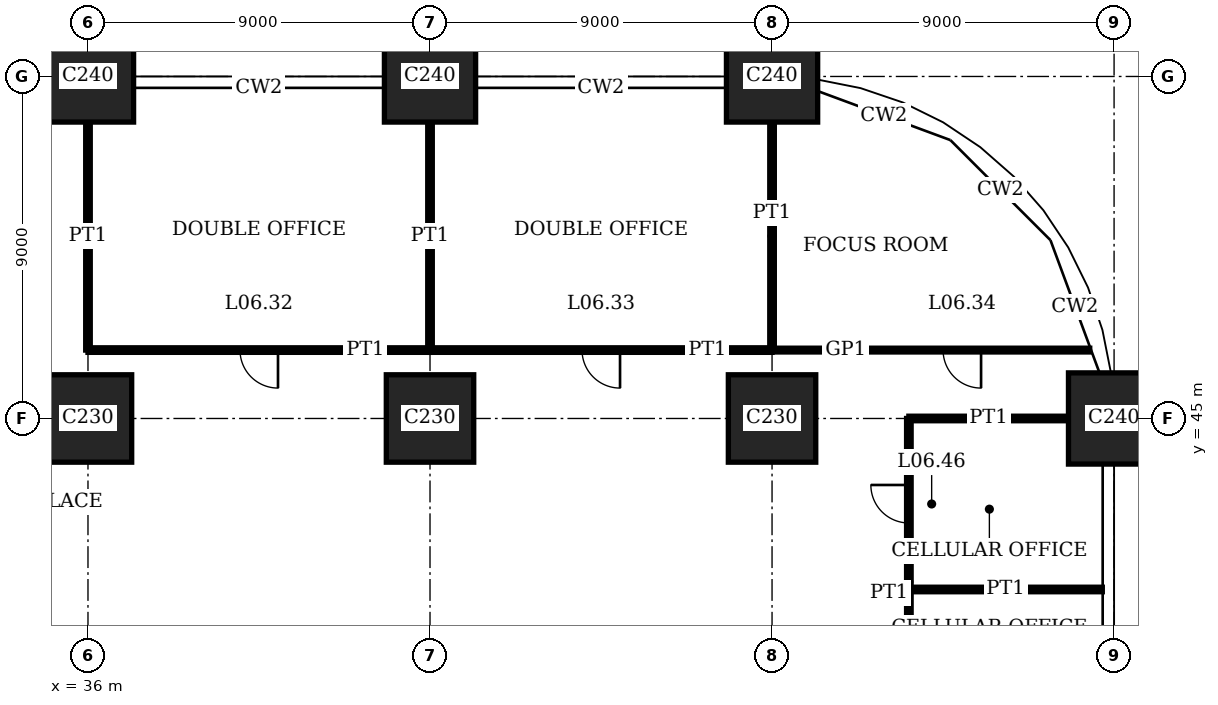
"""IFC4 building model, lengths in metres.
Left out: names, types, materials, properties, quantities, classifications, styles, units other than length and angle.
Written with IfcOpenShell. Run it as: python <this file> out.ifc"""

import sys

from ifc_helpers import new_model, si_unit, direction, frame, frame_2d, origin, origin_2d, place, context, subcontext, project, spatial, rectangle, extrude, element, fill, save


model = new_model("IFC4")
c1 = context("Model", 3, precision=1e-05, world=origin(), true_north=direction((0.0, 1.0)))
c2 = subcontext(c1, "Body", "Model", "MODEL_VIEW")
j1 = project(units=[si_unit("LENGTHUNIT", "METRE"), si_unit("PLANEANGLEUNIT", "RADIAN")], contexts=[c1])
p1 = place(None, origin())
s1 = spatial("IfcSite", under=j1, at=p1, CompositionType="ELEMENT")
p2 = place(p1, origin())
s2 = spatial("IfcBuilding", under=s1, at=p2, CompositionType="ELEMENT")
p3 = place(p2, frame((0.0, 0.0, 27.8)))
s3 = spatial("IfcBuildingStorey", under=s2, at=p3, CompositionType="ELEMENT", Elevation=27.8)
p4 = place(p3, frame((36.0, 45.0, 0.0), z_axis=(0.0, 0.0, 1.0), x_axis=(1.0, 0.0, 0.0)))
e1 = element("IfcColumn", 1, at=p4, inside=s3, PredefinedType="COLUMN", context=c2, shape_type="SweptSolid", body=[
    extrude(rectangle(XDim=2.3, YDim=2.3, at=origin_2d()), origin(), (0.0, 0.0, 1.0), 4.0),
])
p5 = place(p3, frame((36.0, 54.0, 0.0), z_axis=(0.0, 0.0, 1.0), x_axis=(1.0, 0.0, 0.0)))
e2 = element("IfcColumn", 2, at=p5, inside=s3, PredefinedType="COLUMN", context=c2, shape_type="SweptSolid", body=[
    extrude(rectangle(XDim=2.4, YDim=2.4, at=origin_2d()), origin(), (0.0, 0.0, 1.0), 4.0),
])
p6 = place(p3, frame((45.0, 45.0, 0.0), z_axis=(0.0, 0.0, 1.0), x_axis=(1.0, 0.0, 0.0)))
e3 = element("IfcColumn", 3, at=p6, inside=s3, PredefinedType="COLUMN", context=c2, shape_type="SweptSolid", body=[
    extrude(rectangle(XDim=2.3, YDim=2.3, at=origin_2d()), origin(), (0.0, 0.0, 1.0), 4.0),
])
p7 = place(p3, frame((45.0, 54.0, 0.0), z_axis=(0.0, 0.0, 1.0), x_axis=(1.0, 0.0, 0.0)))
e4 = element("IfcColumn", 4, at=p7, inside=s3, PredefinedType="COLUMN", context=c2, shape_type="SweptSolid", body=[
    extrude(rectangle(XDim=2.4, YDim=2.4, at=origin_2d()), origin(), (0.0, 0.0, 1.0), 4.0),
])
p8 = place(p3, frame((54.0, 45.0, 0.0), z_axis=(0.0, 0.0, 1.0), x_axis=(1.0, 0.0, 0.0)))
e5 = element("IfcColumn", 5, at=p8, inside=s3, PredefinedType="COLUMN", context=c2, shape_type="SweptSolid", body=[
    extrude(rectangle(XDim=2.3, YDim=2.3, at=origin_2d()), origin(), (0.0, 0.0, 1.0), 4.0),
])
for number, where, z_axis, x_axis in (
    (6, (54.0, 54.0, 0.0), (0.0, 0.0, 1.0), (1.0, 0.0, 0.0)),
    (7, (63.0, 45.0, 0.0), (0.0, 0.0, 1.0), (1.0, 0.0, 0.0)),
):
    element("IfcColumn", number, at=place(p3, frame(where, z_axis=z_axis, x_axis=x_axis)), inside=s3, PredefinedType="COLUMN", context=c2, shape_type="SweptSolid", body=[
        extrude(rectangle(XDim=2.4, YDim=2.4, at=origin_2d()), origin(), (0.0, 0.0, 1.0), 4.0),
    ])
p9 = place(p3, frame((57.6, 40.5, 0.0), z_axis=(0.0, 0.0, 1.0), x_axis=(1.0, 0.0, 0.0)))
e8 = element("IfcWall", 8, at=p9, inside=s3, PredefinedType="PARTITIONING", context=c2, shape_type="SweptSolid", body=[
    extrude(rectangle(XDim=5.09, YDim=0.12, at=frame_2d((2.545, 0.0))), origin(), (0.0, 0.0, 1.0), 3.1),
])
p10 = place(p3, frame((57.6, 45.0, 0.0), z_axis=(0.0, 0.0, 1.0), x_axis=(1.0, 0.0, 0.0)))
e9 = element("IfcWall", 9, at=p10, inside=s3, PredefinedType="PARTITIONING", context=c2, shape_type="SweptSolid", body=[
    extrude(rectangle(XDim=4.2, YDim=0.12, at=frame_2d((2.1, 0.0))), origin(), (0.0, 0.0, 1.0), 3.05),
])
p11 = place(p3, frame((36.0, 46.8, 0.0), z_axis=(0.0, 0.0, 1.0), x_axis=(1.0, 0.0, 0.0)))
e10 = element("IfcWall", 10, at=p11, inside=s3, PredefinedType="PARTITIONING", context=c2, shape_type="SweptSolid", body=[
    extrude(rectangle(XDim=9.0, YDim=0.12, at=frame_2d((4.5, 0.0))), origin(), (0.0, 0.0, 1.0), 3.75),
])
p12 = place(p11, frame((4.0, 0.0, 0.0)))
e11 = element("IfcOpeningElement", 11, at=p12, cuts=e10, PredefinedType="OPENING", context=c2, shape_type="SweptSolid", body=[
    extrude(rectangle(XDim=1.0, YDim=2.4, at=frame_2d((0.5, 1.2))), frame((0.0, 0.07, 0.0), z_axis=(0.0, -1.0, 0.0), x_axis=(1.0, 0.0, 0.0)), (0.0, 0.0, 1.0), 0.14),
])
p13 = place(p3, frame((45.0, 46.8, 0.0), z_axis=(0.0, 0.0, 1.0), x_axis=(1.0, 0.0, 0.0)))
e12 = element("IfcWall", 12, at=p13, inside=s3, PredefinedType="PARTITIONING", context=c2, shape_type="SweptSolid", body=[
    extrude(rectangle(XDim=9.0, YDim=0.12, at=frame_2d((4.5, 0.0))), origin(), (0.0, 0.0, 1.0), 3.75),
])
p14 = place(p13, frame((4.0, 0.0, 0.0)))
e13 = element("IfcOpeningElement", 13, at=p14, cuts=e12, PredefinedType="OPENING", context=c2, shape_type="SweptSolid", body=[
    extrude(rectangle(XDim=1.0, YDim=2.4, at=frame_2d((0.5, 1.2))), frame((0.0, 0.07, 0.0), z_axis=(0.0, -1.0, 0.0), x_axis=(1.0, 0.0, 0.0)), (0.0, 0.0, 1.0), 0.14),
])
p15 = place(p3, frame((54.0, 46.8, 0.0), z_axis=(0.0, 0.0, 1.0), x_axis=(1.0, 0.0, 0.0)))
e14 = element("IfcWall", 14, at=p15, inside=s3, PredefinedType="PARTITIONING", context=c2, shape_type="SweptSolid", body=[
    extrude(rectangle(XDim=8.359, YDim=0.1, at=frame_2d((4.18, 0.0))), origin(), (0.0, 0.0, 1.0), 3.75),
])
p16 = place(p15, frame((4.5, 0.0, 0.0)))
e15 = element("IfcOpeningElement", 15, at=p16, cuts=e14, PredefinedType="OPENING", context=c2, shape_type="SweptSolid", body=[
    extrude(rectangle(XDim=1.0, YDim=2.4, at=frame_2d((0.5, 1.2))), frame((0.0, 0.06, 0.0), z_axis=(0.0, -1.0, 0.0), x_axis=(1.0, 0.0, 0.0)), (0.0, 0.0, 1.0), 0.12),
])
for number, where, z_axis, x_axis in (
    (16, (36.0, 46.8, 0.0), (0.0, 0.0, 1.0), (0.0, 1.0, 0.0)),
    (17, (45.0, 46.8, 0.0), (0.0, 0.0, 1.0), (0.0, 1.0, 0.0)),
    (18, (54.0, 46.8, 0.0), (0.0, 0.0, 1.0), (0.0, 1.0, 0.0)),
):
    element("IfcWall", number, at=place(p3, frame(where, z_axis=z_axis, x_axis=x_axis)), inside=s3, PredefinedType="PARTITIONING", context=c2, shape_type="SweptSolid", body=[
        extrude(rectangle(XDim=6.0, YDim=0.12, at=frame_2d((3.0, 0.0))), origin(), (0.0, 0.0, 1.0), 3.05),
    ])
p17 = place(p3, frame((57.6, 36.0, 0.0), z_axis=(0.0, 0.0, 1.0), x_axis=(0.0, 1.0, 0.0)))
e19 = element("IfcWall", 19, at=p17, inside=s3, PredefinedType="PARTITIONING", context=c2, shape_type="SweptSolid", body=[
    extrude(rectangle(XDim=4.5, YDim=0.12, at=frame_2d((2.25, 0.0))), origin(), (0.0, 0.0, 1.0), 3.75),
])
p18 = place(p17, frame((1.75, 0.0, 0.0)))
e20 = element("IfcOpeningElement", 20, at=p18, cuts=e19, PredefinedType="OPENING", context=c2, shape_type="SweptSolid", body=[
    extrude(rectangle(XDim=1.0, YDim=2.4, at=frame_2d((0.5, 1.2))), frame((0.0, 0.07, 0.0), z_axis=(0.0, -1.0, 0.0), x_axis=(1.0, 0.0, 0.0)), (0.0, 0.0, 1.0), 0.14),
])
p19 = place(p3, frame((57.6, 40.5, 0.0), z_axis=(0.0, 0.0, 1.0), x_axis=(0.0, 1.0, 0.0)))
e21 = element("IfcWall", 21, at=p19, inside=s3, PredefinedType="PARTITIONING", context=c2, shape_type="SweptSolid", body=[
    extrude(rectangle(XDim=4.5, YDim=0.12, at=frame_2d((2.25, 0.0))), origin(), (0.0, 0.0, 1.0), 3.75),
])
p20 = place(p19, frame((1.75, 0.0, 0.0)))
e22 = element("IfcOpeningElement", 22, at=p20, cuts=e21, PredefinedType="OPENING", context=c2, shape_type="SweptSolid", body=[
    extrude(rectangle(XDim=1.0, YDim=2.4, at=frame_2d((0.5, 1.2))), frame((0.0, 0.07, 0.0), z_axis=(0.0, -1.0, 0.0), x_axis=(1.0, 0.0, 0.0)), (0.0, 0.0, 1.0), 0.14),
])
p21 = place(p12, origin())
e23 = element("IfcDoor", 23, at=p21, inside=s3, OperationType="SINGLE_SWING_RIGHT", PredefinedType="DOOR", context=c2, shape_type="SweptSolid", body=[
    extrude(rectangle(XDim=1.0, YDim=2.4, at=frame_2d((0.5, 1.2))), frame((0.0, 0.025, 0.0), z_axis=(0.0, -1.0, 0.0), x_axis=(1.0, 0.0, 0.0)), (0.0, 0.0, 1.0), 0.05),
])
fill(e11, e23)
p22 = place(p14, origin())
e24 = element("IfcDoor", 24, at=p22, inside=s3, OperationType="SINGLE_SWING_RIGHT", PredefinedType="DOOR", context=c2, shape_type="SweptSolid", body=[
    extrude(rectangle(XDim=1.0, YDim=2.4, at=frame_2d((0.5, 1.2))), frame((0.0, 0.025, 0.0), z_axis=(0.0, -1.0, 0.0), x_axis=(1.0, 0.0, 0.0)), (0.0, 0.0, 1.0), 0.05),
])
fill(e13, e24)
p23 = place(p16, origin())
e25 = element("IfcDoor", 25, at=p23, inside=s3, OperationType="SINGLE_SWING_RIGHT", PredefinedType="DOOR", context=c2, shape_type="SweptSolid", body=[
    extrude(rectangle(XDim=1.0, YDim=2.4, at=frame_2d((0.5, 1.2))), frame((0.0, 0.02, 0.0), z_axis=(0.0, -1.0, 0.0), x_axis=(1.0, 0.0, 0.0)), (0.0, 0.0, 1.0), 0.04),
])
fill(e15, e25)
p24 = place(p20, origin())
e26 = element("IfcDoor", 26, at=p24, inside=s3, OperationType="SINGLE_SWING_LEFT", PredefinedType="DOOR", context=c2, shape_type="SweptSolid", body=[
    extrude(rectangle(XDim=1.0, YDim=2.4, at=frame_2d((0.5, 1.2))), frame((0.0, 0.025, 0.0), z_axis=(0.0, -1.0, 0.0), x_axis=(1.0, 0.0, 0.0)), (0.0, 0.0, 1.0), 0.05),
])
fill(e22, e26)
save(model, sys.argv[1])
